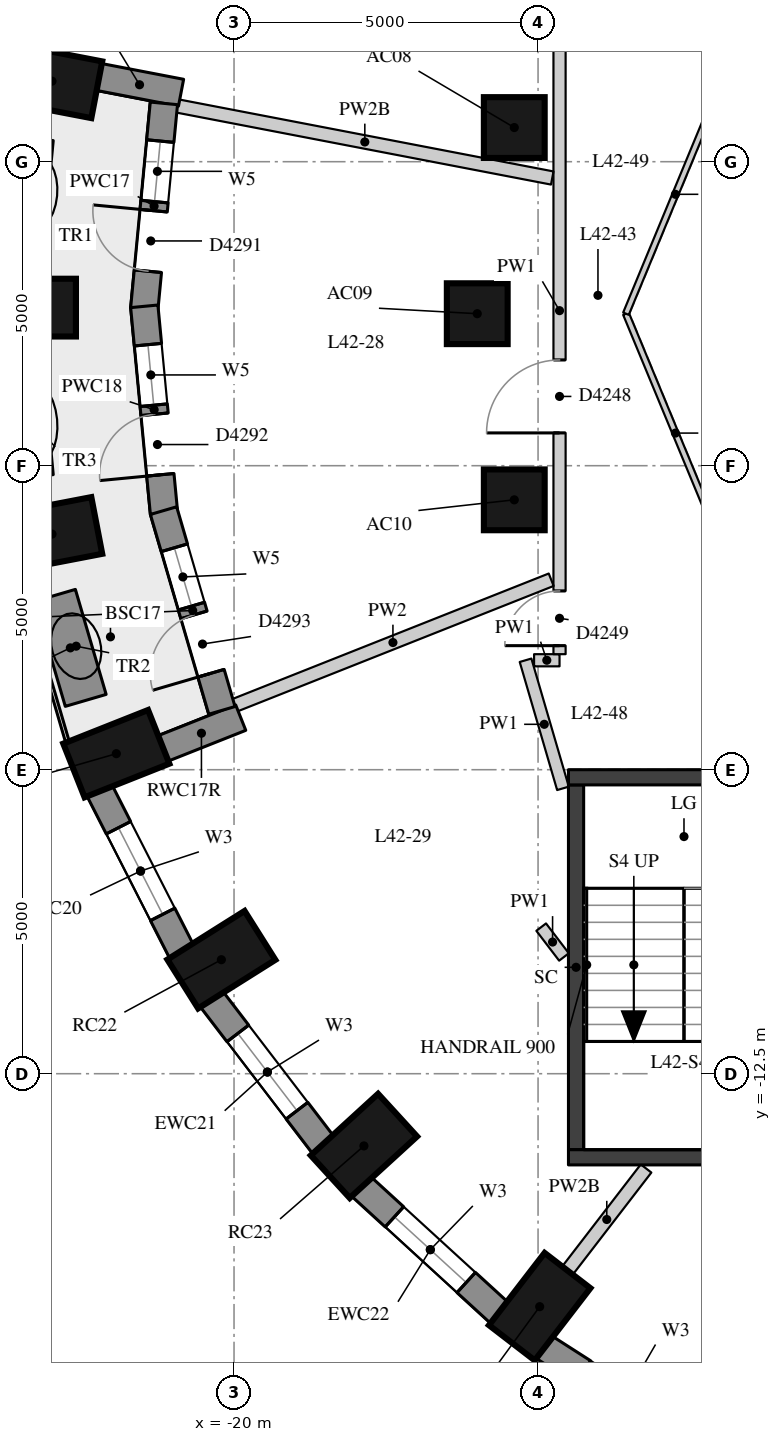
"""IFC4 building model, lengths in metres.
Left out: names, types, materials, properties, quantities, classifications, styles, units other than length and angle.
Written with IfcOpenShell. Run it as: python <this file> out.ifc"""

import sys

from ifc_helpers import new_model, si_unit, direction, frame, frame_2d, origin, origin_2d, place, context, subcontext, project, spatial, rectangle, extrude, element, fill, save


model = new_model("IFC4")
c1 = context("Model", 3, precision=1e-05, world=origin(), true_north=direction((0.0, 1.0)))
c2 = subcontext(c1, "Body", "Model", "MODEL_VIEW")
j1 = project(units=[si_unit("LENGTHUNIT", "METRE"), si_unit("PLANEANGLEUNIT", "RADIAN")], contexts=[c1])
p1 = place(None, origin())
s1 = spatial("IfcSite", under=j1, at=p1, CompositionType="ELEMENT")
p2 = place(p1, origin())
s2 = spatial("IfcBuilding", under=s1, at=p2, CompositionType="ELEMENT")
p3 = place(p2, frame((0.0, 0.0, 151.7)))
s3 = spatial("IfcBuildingStorey", under=s2, at=p3, CompositionType="ELEMENT", Elevation=151.7)
for number, where, z_axis, x_axis in (
    (1, (-22.994, 3.825, 0.0), (0.0, 0.0, 1.0), (-0.982, 0.189, 0.0)),
    (2, (-23.35, 0.1, 0.0), (0.0, 0.0, 1.0), (-1.0, 0.0, 0.0)),
    (3, (-22.994, -3.625, 0.0), (0.0, 0.0, 1.0), (-0.982, -0.189, 0.0)),
    (4, (-21.936, -7.236, 0.0), (0.0, 0.0, 1.0), (-0.93, -0.369, 0.0)),
    (5, (-20.208, -10.625, 0.0), (0.0, 0.0, 1.0), (-0.846, -0.533, 0.0)),
    (6, (-17.864, -13.688, 0.0), (0.0, 0.0, 1.0), (-0.738, -0.675, 0.0)),
    (7, (-14.973, -16.332, 0.0), (0.0, 0.0, 1.0), (-0.61, -0.792, 0.0)),
):
    element("IfcColumn", number, at=place(p3, frame(where, z_axis=z_axis, x_axis=x_axis)), inside=s3, PredefinedType="COLUMN", context=c2, shape_type="SweptSolid", body=[
        extrude(rectangle(XDim=1.5, YDim=0.95, at=origin_2d()), origin(), (0.0, 0.0, 1.0), 3.3),
    ])
for number, where, z_axis, x_axis in (
    (8, (-15.391, 3.062, 0.0), (0.0, 0.0, 1.0), (1.0, 0.0, 0.0)),
    (9, (-16.0, 0.0, 0.0), (0.0, 0.0, 1.0), (1.0, 0.0, 0.0)),
    (10, (-15.391, -3.062, 0.0), (0.0, 0.0, 1.0), (1.0, 0.0, 0.0)),
):
    element("IfcColumn", number, at=place(p3, frame(where, z_axis=z_axis, x_axis=x_axis)), inside=s3, PredefinedType="COLUMN", context=c2, shape_type="SweptSolid", body=[
        extrude(rectangle(XDim=1.0, YDim=1.0, at=origin_2d()), origin(), (0.0, 0.0, 1.0), 3.3),
    ])
p4 = place(p3, frame((-22.551, 7.191, 0.0), z_axis=(0.0, 0.0, 1.0), x_axis=(-0.281125768296, -0.959670934435, 0.0)))
e11 = element("IfcWall", 11, at=p4, inside=s3, PredefinedType="SOLIDWALL", context=c2, shape_type="SweptSolid", body=[
    extrude(rectangle(XDim=2.948, YDim=0.45, at=frame_2d((1.474, 0.0))), origin(), (0.0, 0.0, 1.0), 3.02),
])
p5 = place(p4, frame((0.674, 0.0, 0.4)))
e12 = element("IfcOpeningElement", 12, at=p5, cuts=e11, PredefinedType="OPENING", context=c2, shape_type="SweptSolid", body=[
    extrude(rectangle(XDim=1.6, YDim=1.75, at=frame_2d((0.8, 0.875))), frame((0.0, 0.235, 0.0), z_axis=(0.0, -1.0, 0.0), x_axis=(1.0, 0.0, 0.0)), (0.0, 0.0, 1.0), 0.47),
])
p6 = place(p3, frame((-22.215, -7.837, 0.0), z_axis=(0.0, 0.0, 1.0), x_axis=(0.454133999889, -0.890933392653, 0.0)))
e13 = element("IfcWall", 13, at=p6, inside=s3, PredefinedType="SOLIDWALL", context=c2, shape_type="SweptSolid", body=[
    extrude(rectangle(XDim=2.986, YDim=0.45, at=frame_2d((1.493, 0.0))), origin(), (0.0, 0.0, 1.0), 3.02),
])
p7 = place(p6, frame((0.693, 0.0, 0.4)))
e14 = element("IfcOpeningElement", 14, at=p7, cuts=e13, PredefinedType="OPENING", context=c2, shape_type="SweptSolid", body=[
    extrude(rectangle(XDim=1.6, YDim=1.75, at=frame_2d((0.8, 0.875))), frame((0.0, 0.235, 0.0), z_axis=(0.0, -1.0, 0.0), x_axis=(1.0, 0.0, 0.0)), (0.0, 0.0, 1.0), 0.47),
])
p8 = place(p3, frame((-20.374, -11.267, 0.0), z_axis=(0.0, 0.0, 1.0), x_axis=(0.607817056371, -0.794077090706, 0.0)))
e15 = element("IfcWall", 15, at=p8, inside=s3, PredefinedType="SOLIDWALL", context=c2, shape_type="SweptSolid", body=[
    extrude(rectangle(XDim=3.037, YDim=0.45, at=frame_2d((1.519, 0.0))), origin(), (0.0, 0.0, 1.0), 3.02),
])
p9 = place(p8, frame((0.719, 0.0, 0.4)))
e16 = element("IfcOpeningElement", 16, at=p9, cuts=e15, PredefinedType="OPENING", context=c2, shape_type="SweptSolid", body=[
    extrude(rectangle(XDim=1.6, YDim=1.75, at=frame_2d((0.8, 0.875))), frame((0.0, 0.235, 0.0), z_axis=(0.0, -1.0, 0.0), x_axis=(1.0, 0.0, 0.0)), (0.0, 0.0, 1.0), 0.47),
])
p10 = place(p3, frame((-17.913, -14.35, 0.0), z_axis=(0.0, 0.0, 1.0), x_axis=(0.737808755941, -0.675009807082, 0.0)))
e17 = element("IfcWall", 17, at=p10, inside=s3, PredefinedType="SOLIDWALL", context=c2, shape_type="SweptSolid", body=[
    extrude(rectangle(XDim=3.094, YDim=0.45, at=frame_2d((1.547, 0.0))), origin(), (0.0, 0.0, 1.0), 3.02),
])
p11 = place(p10, frame((0.747, 0.0, 0.4)))
e18 = element("IfcOpeningElement", 18, at=p11, cuts=e17, PredefinedType="OPENING", context=c2, shape_type="SweptSolid", body=[
    extrude(rectangle(XDim=1.6, YDim=1.75, at=frame_2d((0.8, 0.875))), frame((0.0, 0.235, 0.0), z_axis=(0.0, -1.0, 0.0), x_axis=(1.0, 0.0, 0.0)), (0.0, 0.0, 1.0), 0.47),
])
p12 = place(p3, frame((-14.908, -16.993, 0.0), z_axis=(0.0, 0.0, 1.0), x_axis=(0.842065914439, -0.539374633943, 0.0)))
e19 = element("IfcWall", 19, at=p12, inside=s3, PredefinedType="SOLIDWALL", context=c2, shape_type="SweptSolid", body=[
    extrude(rectangle(XDim=3.151, YDim=0.45, at=frame_2d((1.576, 0.0))), origin(), (0.0, 0.0, 1.0), 3.02),
])
p13 = place(p12, frame((0.776, 0.0, 0.4)))
e20 = element("IfcOpeningElement", 20, at=p13, cuts=e19, PredefinedType="OPENING", context=c2, shape_type="SweptSolid", body=[
    extrude(rectangle(XDim=1.6, YDim=1.75, at=frame_2d((0.8, 0.875))), frame((0.0, 0.235, 0.0), z_axis=(0.0, -1.0, 0.0), x_axis=(1.0, 0.0, 0.0)), (0.0, 0.0, 1.0), 0.47),
])
p14 = place(p3, frame((-22.237, 3.896, 0.0), z_axis=(0.0, 0.0, 1.0), x_axis=(0.98204526411, -0.188645432598, 0.0)))
e21 = element("IfcWall", 21, at=p14, inside=s3, PredefinedType="SOLIDWALL", context=c2, shape_type="SweptSolid", body=[
    extrude(rectangle(XDim=1.39, YDim=0.45, at=frame_2d((0.695, 0.0))), origin(), (0.0, 0.0, 1.0), 2.57),
])
p15 = place(p3, frame((-21.182, -7.156, 0.0), z_axis=(0.0, 0.0, 1.0), x_axis=(0.929514600716, 0.368785312961, 0.0)))
e22 = element("IfcWall", 22, at=p15, inside=s3, PredefinedType="SOLIDWALL", context=c2, shape_type="SweptSolid", body=[
    extrude(rectangle(XDim=1.39, YDim=0.45, at=frame_2d((0.695, 0.0))), origin(), (0.0, 0.0, 1.0), 3.02),
])
p16 = place(p3, frame((-21.154, 3.459, 0.0), z_axis=(0.0, 0.0, 1.0), x_axis=(-0.094968544931, -0.995480273774, 0.0)))
e23 = element("IfcWall", 23, at=p16, inside=s3, PredefinedType="SOLIDWALL", context=c2, shape_type="SweptSolid", body=[
    extrude(rectangle(XDim=3.396, YDim=0.45, at=frame_2d((1.698, 0.0))), origin(), (0.0, 0.0, 1.0), 3.02),
])
p17 = place(p16, frame((0.623, 0.0, 0.4)))
e24 = element("IfcOpeningElement", 24, at=p17, cuts=e23, PredefinedType="OPENING", context=c2, shape_type="SweptSolid", body=[
    extrude(rectangle(XDim=1.0, YDim=1.75, at=frame_2d((0.5, 0.875))), frame((0.0, 0.235, 0.0), z_axis=(0.0, -1.0, 0.0), x_axis=(1.0, 0.0, 0.0)), (0.0, 0.0, 1.0), 0.47),
])
p18 = place(p16, frame((1.773, 0.0, 0.0)))
e25 = element("IfcOpeningElement", 25, at=p18, cuts=e23, PredefinedType="OPENING", context=c2, shape_type="SweptSolid", body=[
    extrude(rectangle(XDim=1.0, YDim=2.15, at=frame_2d((0.5, 1.075))), frame((0.0, 0.235, 0.0), z_axis=(0.0, -1.0, 0.0), x_axis=(1.0, 0.0, 0.0)), (0.0, 0.0, 1.0), 0.47),
])
p19 = place(p3, frame((-21.476, 0.121, 0.0), z_axis=(0.0, 0.0, 1.0), x_axis=(0.094947321258, -0.995482298279, 0.0)))
e26 = element("IfcWall", 26, at=p19, inside=s3, PredefinedType="SOLIDWALL", context=c2, shape_type="SweptSolid", body=[
    extrude(rectangle(XDim=3.417, YDim=0.45, at=frame_2d((1.708, 0.0))), origin(), (0.0, 0.0, 1.0), 3.02),
])
p20 = place(p19, frame((0.634, 0.0, 0.4)))
e27 = element("IfcOpeningElement", 27, at=p20, cuts=e26, PredefinedType="OPENING", context=c2, shape_type="SweptSolid", body=[
    extrude(rectangle(XDim=1.0, YDim=1.75, at=frame_2d((0.5, 0.875))), frame((0.0, 0.235, 0.0), z_axis=(0.0, -1.0, 0.0), x_axis=(1.0, 0.0, 0.0)), (0.0, 0.0, 1.0), 0.47),
])
p21 = place(p19, frame((1.784, 0.0, 0.0)))
e28 = element("IfcOpeningElement", 28, at=p21, cuts=e26, PredefinedType="OPENING", context=c2, shape_type="SweptSolid", body=[
    extrude(rectangle(XDim=1.0, YDim=2.15, at=frame_2d((0.5, 1.075))), frame((0.0, 0.235, 0.0), z_axis=(0.0, -1.0, 0.0), x_axis=(1.0, 0.0, 0.0)), (0.0, 0.0, 1.0), 0.47),
])
p22 = place(p3, frame((-21.159, -3.239, 0.0), z_axis=(0.0, 0.0, 1.0), x_axis=(0.280377942886, -0.959889685924, 0.0)))
e29 = element("IfcWall", 29, at=p22, inside=s3, PredefinedType="SOLIDWALL", context=c2, shape_type="SweptSolid", body=[
    extrude(rectangle(XDim=3.423, YDim=0.45, at=frame_2d((1.711, 0.0))), origin(), (0.0, 0.0, 1.0), 3.02),
])
p23 = place(p22, frame((0.636, 0.0, 0.4)))
e30 = element("IfcOpeningElement", 30, at=p23, cuts=e29, PredefinedType="OPENING", context=c2, shape_type="SweptSolid", body=[
    extrude(rectangle(XDim=1.0, YDim=1.75, at=frame_2d((0.5, 0.875))), frame((0.0, 0.235, 0.0), z_axis=(0.0, -1.0, 0.0), x_axis=(1.0, 0.0, 0.0)), (0.0, 0.0, 1.0), 0.47),
])
p24 = place(p22, frame((1.786, 0.0, 0.0)))
e31 = element("IfcOpeningElement", 31, at=p24, cuts=e29, PredefinedType="OPENING", context=c2, shape_type="SweptSolid", body=[
    extrude(rectangle(XDim=1.0, YDim=2.15, at=frame_2d((0.5, 1.075))), frame((0.0, 0.235, 0.0), z_axis=(0.0, -1.0, 0.0), x_axis=(1.0, 0.0, 0.0)), (0.0, 0.0, 1.0), 0.47),
])
for number, where, z_axis, x_axis in (
    (32, (-23.322, 2.881, 0.0), (0.0, 0.0, 1.0), (-0.095, -0.995, 0.0)),
    (33, (-23.493, -0.889, 0.0), (0.0, 0.0, 1.0), (0.095, -0.995, 0.0)),
    (34, (-22.945, -4.633, 0.0), (0.0, 0.0, 1.0), (0.281, -0.96, 0.0)),
):
    element("IfcWall", number, at=place(p3, frame(where, z_axis=z_axis, x_axis=x_axis)), inside=s3, PredefinedType="USERDEFINED", context=c2, shape_type="SweptSolid", body=[
        extrude(rectangle(XDim=1.8, YDim=0.7, at=frame_2d((0.9, 0.0))), origin(), (0.0, 0.0, 1.0), 0.75),
    ])
p25 = place(p3, frame((-14.375, -13.75, -0.28), z_axis=(0.0, 0.0, 1.0), x_axis=(0.0, 1.0, 0.0)))
e35 = element("IfcWall", 35, at=p25, inside=s3, PredefinedType="SHEAR", context=c2, shape_type="SweptSolid", body=[
    extrude(rectangle(XDim=6.0, YDim=0.25, at=frame_2d((3.0, 0.0))), origin(), (0.0, 0.0, 1.0), 3.3),
])
for number, where, z_axis, x_axis in (
    (36, (-14.5, -7.625, -0.28), (0.0, 0.0, 1.0), (1.0, 0.0, 0.0)),
    (37, (-14.5, -13.875, -0.28), (0.0, 0.0, 1.0), (1.0, 0.0, 0.0)),
):
    element("IfcWall", number, at=place(p3, frame(where, z_axis=z_axis, x_axis=x_axis)), inside=s3, PredefinedType="SHEAR", context=c2, shape_type="SweptSolid", body=[
        extrude(rectangle(XDim=5.2, YDim=0.25, at=frame_2d((2.6, 0.0))), origin(), (0.0, 0.0, 1.0), 3.3),
    ])
p26 = place(p3, frame((-14.574, -10.58, 0.0), z_axis=(0.0, 0.0, 1.0), x_axis=(-0.606745625174, 0.794896060081, 0.0)))
e38 = element("IfcWall", 38, at=p26, inside=s3, PredefinedType="PARTITIONING", context=c2, shape_type="SweptSolid", body=[
    extrude(rectangle(XDim=0.618, YDim=0.2, at=frame_2d((0.309, 0.0))), origin(), (0.0, 0.0, 1.0), 3.02),
])
p27 = place(p3, frame((-14.59, -7.807, 0.0), z_axis=(0.0, 0.0, 1.0), x_axis=(-0.280401457903, 0.959882817018, 0.0)))
e39 = element("IfcWall", 39, at=p27, inside=s3, PredefinedType="PARTITIONING", context=c2, shape_type="SweptSolid", body=[
    extrude(rectangle(XDim=2.195, YDim=0.2, at=frame_2d((1.098, 0.0))), origin(), (0.0, 0.0, 1.0), 3.02),
])
p28 = place(p3, frame((-15.065, -5.7, 0.0), z_axis=(0.0, 0.0, 1.0), x_axis=(1.0, 0.0, 0.0)))
e40 = element("IfcWall", 40, at=p28, inside=s3, PredefinedType="PARTITIONING", context=c2, shape_type="SweptSolid", body=[
    extrude(rectangle(XDim=0.419, YDim=0.2, at=frame_2d((0.209, 0.0))), origin(), (0.0, 0.0, 1.0), 3.02),
])
p29 = place(p3, frame((-14.647, -5.6, 0.0), z_axis=(0.0, 0.0, 1.0), x_axis=(0.0, 1.0, 0.0)))
e41 = element("IfcWall", 41, at=p29, inside=s3, PredefinedType="PARTITIONING", context=c2, shape_type="SweptSolid", body=[
    extrude(rectangle(XDim=11.3, YDim=0.2, at=frame_2d((5.65, 0.0))), origin(), (0.0, 0.0, 1.0), 3.02),
])
p30 = place(p29, frame((10.06, 0.0, 0.0)))
e42 = element("IfcOpeningElement", 42, at=p30, cuts=e41, PredefinedType="OPENING", context=c2, shape_type="SweptSolid", body=[
    extrude(rectangle(XDim=1.1, YDim=2.1, at=frame_2d((0.55, 1.05))), frame((0.0, 0.11, 0.0), z_axis=(0.0, -1.0, 0.0), x_axis=(1.0, 0.0, 0.0)), (0.0, 0.0, 1.0), 0.22),
])
p31 = place(p29, frame((3.639, 0.0, 0.0)))
e43 = element("IfcOpeningElement", 43, at=p31, cuts=e41, PredefinedType="OPENING", context=c2, shape_type="SweptSolid", body=[
    extrude(rectangle(XDim=1.2, YDim=2.1, at=frame_2d((0.6, 1.05))), frame((0.0, 0.11, 0.0), z_axis=(0.0, -1.0, 0.0), x_axis=(1.0, 0.0, 0.0)), (0.0, 0.0, 1.0), 0.22),
])
p32 = place(p29, frame((0.14, 0.0, 0.0)))
e44 = element("IfcOpeningElement", 44, at=p32, cuts=e41, PredefinedType="OPENING", context=c2, shape_type="SweptSolid", body=[
    extrude(rectangle(XDim=0.9, YDim=2.1, at=frame_2d((0.45, 1.05))), frame((0.0, 0.11, 0.0), z_axis=(0.0, -1.0, 0.0), x_axis=(1.0, 0.0, 0.0)), (0.0, 0.0, 1.0), 0.22),
])
p33 = place(p3, frame((-20.932, 3.417, 0.0), z_axis=(0.0, 0.0, 1.0), x_axis=(0.982023362662, -0.188759410856, 0.0)))
e45 = element("IfcWall", 45, at=p33, inside=s3, PredefinedType="PARTITIONING", context=c2, shape_type="SweptSolid", body=[
    extrude(rectangle(XDim=6.278, YDim=0.22, at=frame_2d((3.139, 0.0))), origin(), (0.0, 0.0, 1.0), 2.57),
])
p34 = place(p3, frame((-19.99, -6.441, 0.0), z_axis=(0.0, 0.0, 1.0), x_axis=(0.929507316491, 0.368803672147, 0.0)))
e46 = element("IfcWall", 46, at=p34, inside=s3, PredefinedType="PARTITIONING", context=c2, shape_type="SweptSolid", body=[
    extrude(rectangle(XDim=5.6, YDim=0.22, at=frame_2d((2.8, 0.0))), origin(), (0.0, 0.0, 1.0), 3.02),
])
p35 = place(p3, frame((-14.516, -15.737, 0.0), z_axis=(0.0, 0.0, 1.0), x_axis=(0.609983624648, 0.792414019097, 0.0)))
e47 = element("IfcWall", 47, at=p35, inside=s3, PredefinedType="PARTITIONING", context=c2, shape_type="SweptSolid", body=[
    extrude(rectangle(XDim=2.118, YDim=0.22, at=frame_2d((1.059, 0.0))), origin(), (0.0, 0.0, 1.0), 2.57),
])
for number, where, z_axis, x_axis in (
    (48, (-11.927, -3.927, 0.0), (0.0, 0.0, 1.0), (-0.383, 0.924, 0.0)),
    (49, (-13.554, 0.0, 0.0), (0.0, 0.0, 1.0), (0.383, 0.924, 0.0)),
):
    element("IfcWall", number, at=place(p3, frame(where, z_axis=z_axis, x_axis=x_axis)), inside=s3, PredefinedType="PARTITIONING", context=c2, shape_type="SweptSolid", body=[
        extrude(rectangle(XDim=4.251, YDim=0.1, at=frame_2d((2.125, 0.0))), origin(), (0.0, 0.0, 1.0), 3.02),
    ])
p36 = place(p7, origin())
e50 = element("IfcWindow", 50, at=p36, inside=s3, PartitioningType="SINGLE_PANEL", PredefinedType="WINDOW", context=c2, shape_type="SweptSolid", body=[
    extrude(rectangle(XDim=1.6, YDim=1.75, at=frame_2d((0.8, 0.875))), frame((0.0, 0.035, 0.0), z_axis=(0.0, -1.0, 0.0), x_axis=(1.0, 0.0, 0.0)), (0.0, 0.0, 1.0), 0.06),
])
fill(e14, e50)
p37 = place(p9, origin())
e51 = element("IfcWindow", 51, at=p37, inside=s3, PartitioningType="SINGLE_PANEL", PredefinedType="WINDOW", context=c2, shape_type="SweptSolid", body=[
    extrude(rectangle(XDim=1.6, YDim=1.75, at=frame_2d((0.8, 0.875))), frame((0.0, 0.035, 0.0), z_axis=(0.0, -1.0, 0.0), x_axis=(1.0, 0.0, 0.0)), (0.0, 0.0, 1.0), 0.06),
])
fill(e16, e51)
p38 = place(p11, origin())
e52 = element("IfcWindow", 52, at=p38, inside=s3, PartitioningType="SINGLE_PANEL", PredefinedType="WINDOW", context=c2, shape_type="SweptSolid", body=[
    extrude(rectangle(XDim=1.6, YDim=1.75, at=frame_2d((0.8, 0.875))), frame((0.0, 0.035, 0.0), z_axis=(0.0, -1.0, 0.0), x_axis=(1.0, 0.0, 0.0)), (0.0, 0.0, 1.0), 0.06),
])
fill(e18, e52)
p39 = place(p17, origin())
e53 = element("IfcWindow", 53, at=p39, inside=s3, PartitioningType="SINGLE_PANEL", PredefinedType="WINDOW", context=c2, shape_type="SweptSolid", body=[
    extrude(rectangle(XDim=1.0, YDim=1.75, at=frame_2d((0.5, 0.875))), frame((0.0, 0.035, 0.0), z_axis=(0.0, -1.0, 0.0), x_axis=(1.0, 0.0, 0.0)), (0.0, 0.0, 1.0), 0.06),
])
fill(e24, e53)
p40 = place(p18, frame((1.0, 0.0, 0.0), z_axis=(0.0, 0.0, 1.0), x_axis=(-1.0, 0.0, 0.0)))
e54 = element("IfcDoor", 54, at=p40, inside=s3, OperationType="SINGLE_SWING_RIGHT", PredefinedType="DOOR", context=c2, shape_type="SweptSolid", body=[
    extrude(rectangle(XDim=1.0, YDim=2.15, at=frame_2d((0.5, 1.075))), frame((0.0, 0.075, 0.0), z_axis=(0.0, -1.0, 0.0), x_axis=(1.0, 0.0, 0.0)), (0.0, 0.0, 1.0), 0.05),
])
fill(e25, e54)
p41 = place(p20, origin())
e55 = element("IfcWindow", 55, at=p41, inside=s3, PartitioningType="SINGLE_PANEL", PredefinedType="WINDOW", context=c2, shape_type="SweptSolid", body=[
    extrude(rectangle(XDim=1.0, YDim=1.75, at=frame_2d((0.5, 0.875))), frame((0.0, 0.035, 0.0), z_axis=(0.0, -1.0, 0.0), x_axis=(1.0, 0.0, 0.0)), (0.0, 0.0, 1.0), 0.06),
])
fill(e27, e55)
p42 = place(p21, frame((1.0, 0.0, 0.0), z_axis=(0.0, 0.0, 1.0), x_axis=(-1.0, 0.0, 0.0)))
e56 = element("IfcDoor", 56, at=p42, inside=s3, OperationType="SINGLE_SWING_LEFT", PredefinedType="DOOR", context=c2, shape_type="SweptSolid", body=[
    extrude(rectangle(XDim=1.0, YDim=2.15, at=frame_2d((0.5, 1.075))), frame((0.0, 0.075, 0.0), z_axis=(0.0, -1.0, 0.0), x_axis=(1.0, 0.0, 0.0)), (0.0, 0.0, 1.0), 0.05),
])
fill(e28, e56)
p43 = place(p23, origin())
e57 = element("IfcWindow", 57, at=p43, inside=s3, PartitioningType="SINGLE_PANEL", PredefinedType="WINDOW", context=c2, shape_type="SweptSolid", body=[
    extrude(rectangle(XDim=1.0, YDim=1.75, at=frame_2d((0.5, 0.875))), frame((0.0, 0.035, 0.0), z_axis=(0.0, -1.0, 0.0), x_axis=(1.0, 0.0, 0.0)), (0.0, 0.0, 1.0), 0.06),
])
fill(e30, e57)
p44 = place(p24, frame((1.0, 0.0, 0.0), z_axis=(0.0, 0.0, 1.0), x_axis=(-1.0, 0.0, 0.0)))
e58 = element("IfcDoor", 58, at=p44, inside=s3, OperationType="SINGLE_SWING_LEFT", PredefinedType="DOOR", context=c2, shape_type="SweptSolid", body=[
    extrude(rectangle(XDim=1.0, YDim=2.15, at=frame_2d((0.5, 1.075))), frame((0.0, 0.075, 0.0), z_axis=(0.0, -1.0, 0.0), x_axis=(1.0, 0.0, 0.0)), (0.0, 0.0, 1.0), 0.05),
])
fill(e31, e58)
p45 = place(p31, origin())
e59 = element("IfcDoor", 59, at=p45, inside=s3, OperationType="SINGLE_SWING_LEFT", PredefinedType="DOOR", context=c2, shape_type="SweptSolid", body=[
    extrude(rectangle(XDim=1.2, YDim=2.1, at=frame_2d((0.6, 1.05))), frame((0.0, 0.025, 0.0), z_axis=(0.0, -1.0, 0.0), x_axis=(1.0, 0.0, 0.0)), (0.0, 0.0, 1.0), 0.05),
])
fill(e43, e59)
p46 = place(p32, origin())
e60 = element("IfcDoor", 60, at=p46, inside=s3, OperationType="SINGLE_SWING_LEFT", PredefinedType="DOOR", context=c2, shape_type="SweptSolid", body=[
    extrude(rectangle(XDim=0.9, YDim=2.1, at=frame_2d((0.45, 1.05))), frame((0.0, 0.025, 0.0), z_axis=(0.0, -1.0, 0.0), x_axis=(1.0, 0.0, 0.0)), (0.0, 0.0, 1.0), 0.05),
])
fill(e44, e60)
save(model, sys.argv[1])
